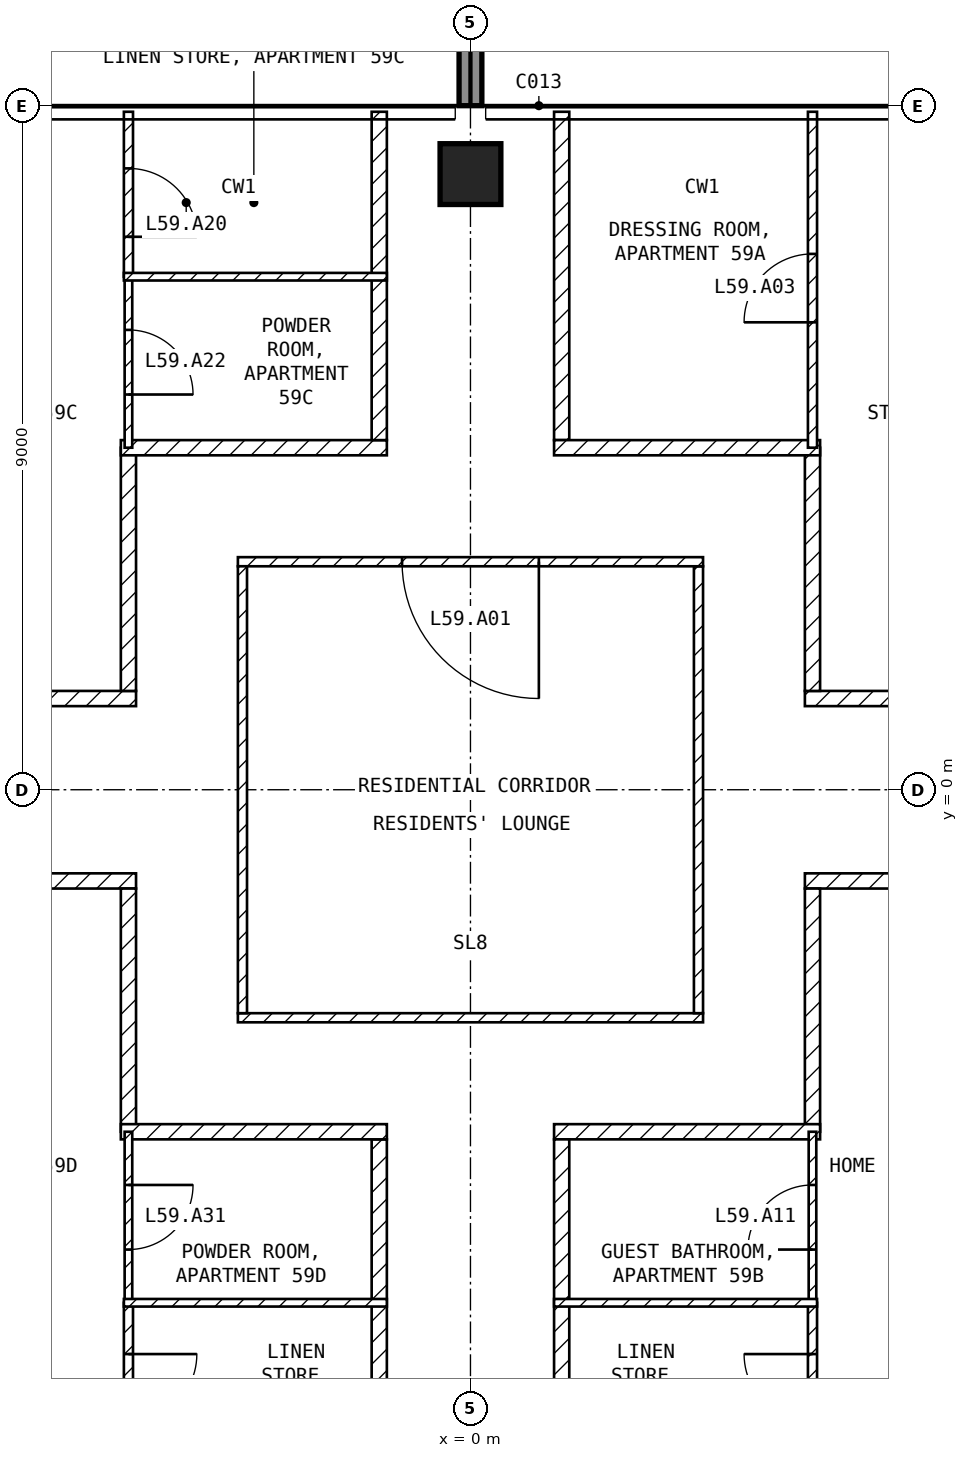
"""IFC4 building model, lengths in metres.
Left out: names, types, materials, properties, quantities, classifications, styles, units other than length and angle.
Written with IfcOpenShell. Run it as: python <this file> out.ifc"""

import sys

from ifc_helpers import new_model, si_unit, direction, frame, frame_2d, origin, origin_2d, place, context, subcontext, project, spatial, rectangle, extrude, element, fill, save


model = new_model("IFC4")
c1 = context("Model", 3, precision=1e-05, world=origin(), true_north=direction((0.0, 1.0)))
c2 = subcontext(c1, "Body", "Model", "MODEL_VIEW")
j1 = project(units=[si_unit("LENGTHUNIT", "METRE"), si_unit("PLANEANGLEUNIT", "RADIAN")], contexts=[c1])
p1 = place(None, origin())
s1 = spatial("IfcSite", under=j1, at=p1, CompositionType="ELEMENT")
p2 = place(p1, origin())
s2 = spatial("IfcBuilding", under=s1, at=p2, CompositionType="ELEMENT")
p3 = place(p2, frame((0.0, 0.0, 236.0)))
s3 = spatial("IfcBuildingStorey", under=s2, at=p3, CompositionType="ELEMENT", Elevation=236.0)
p4 = place(p3, frame((0.0, 8.1, -0.25), z_axis=(0.0, 0.0, 1.0), x_axis=(1.0, 0.0, 0.0)))
e1 = element("IfcColumn", 1, at=p4, inside=s3, PredefinedType="COLUMN", context=c2, shape_type="SweptSolid", body=[
    extrude(rectangle(XDim=0.8, YDim=0.8, at=origin_2d()), origin(), (0.0, 0.0, 1.0), 3.5),
])
p5 = place(p3, frame((0.0, 9.0, 0.0), z_axis=(0.0, 0.0, 1.0), x_axis=(0.0, 1.0, 0.0)))
e2 = element("IfcWall", 2, at=p5, inside=s3, PredefinedType="SOLIDWALL", context=c2, shape_type="SweptSolid", body=[
    extrude(rectangle(XDim=2.7, YDim=0.3, at=frame_2d((1.35, 0.0))), origin(), (0.0, 0.0, 1.0), 3.25),
])
p6 = place(p3, frame((-3.06, -3.0, 0.0), z_axis=(0.0, 0.0, 1.0), x_axis=(1.0, 0.0, 0.0)))
e3 = element("IfcWall", 3, at=p6, inside=s3, PredefinedType="PARTITIONING", context=c2, shape_type="SweptSolid", body=[
    extrude(rectangle(XDim=6.12, YDim=0.12, at=frame_2d((3.06, 0.0))), origin(), (0.0, 0.0, 1.0), 3.25),
])
p7 = place(p3, frame((3.0, -2.94, 0.0), z_axis=(0.0, 0.0, 1.0), x_axis=(0.0, 1.0, 0.0)))
e4 = element("IfcWall", 4, at=p7, inside=s3, PredefinedType="PARTITIONING", context=c2, shape_type="SweptSolid", body=[
    extrude(rectangle(XDim=5.88, YDim=0.12, at=frame_2d((2.94, 0.0))), origin(), (0.0, 0.0, 1.0), 3.25),
])
p8 = place(p3, frame((3.06, 3.0, 0.0), z_axis=(0.0, 0.0, 1.0), x_axis=(-1.0, 0.0, 0.0)))
e5 = element("IfcWall", 5, at=p8, inside=s3, PredefinedType="PARTITIONING", context=c2, shape_type="SweptSolid", body=[
    extrude(rectangle(XDim=6.12, YDim=0.12, at=frame_2d((3.06, 0.0))), origin(), (0.0, 0.0, 1.0), 3.25),
])
p9 = place(p8, frame((2.16, 0.0, 0.0)))
e6 = element("IfcOpeningElement", 6, at=p9, cuts=e5, PredefinedType="OPENING", context=c2, shape_type="SweptSolid", body=[
    extrude(rectangle(XDim=1.8, YDim=2.1, at=frame_2d((0.9, 1.05))), frame((0.0, 0.07, 0.0), z_axis=(0.0, -1.0, 0.0), x_axis=(1.0, 0.0, 0.0)), (0.0, 0.0, 1.0), 0.14),
])
p10 = place(p3, frame((-3.0, 2.94, 0.0), z_axis=(0.0, 0.0, 1.0), x_axis=(0.0, -1.0, 0.0)))
e7 = element("IfcWall", 7, at=p10, inside=s3, PredefinedType="PARTITIONING", context=c2, shape_type="SweptSolid", body=[
    extrude(rectangle(XDim=5.88, YDim=0.12, at=frame_2d((2.94, 0.0))), origin(), (0.0, 0.0, 1.0), 3.25),
])
p11 = place(p3, frame((4.4, 1.2, 0.0), z_axis=(0.0, 0.0, 1.0), x_axis=(1.0, 0.0, 0.0)))
e8 = element("IfcWall", 8, at=p11, inside=s3, PredefinedType="PARTITIONING", context=c2, shape_type="SweptSolid", body=[
    extrude(rectangle(XDim=17.2, YDim=0.2, at=frame_2d((8.6, 0.0))), origin(), (0.0, 0.0, 1.0), 3.25),
])
p12 = place(p11, frame((5.3, 0.0, 0.0)))
e9 = element("IfcOpeningElement", 9, at=p12, cuts=e8, PredefinedType="OPENING", context=c2, shape_type="SweptSolid", body=[
    extrude(rectangle(XDim=1.0, YDim=2.1, at=frame_2d((0.5, 1.05))), frame((0.0, 0.11, 0.0), z_axis=(0.0, -1.0, 0.0), x_axis=(1.0, 0.0, 0.0)), (0.0, 0.0, 1.0), 0.22),
])
p13 = place(p3, frame((4.5, 4.5, 0.0), z_axis=(0.0, 0.0, 1.0), x_axis=(0.0, -1.0, 0.0)))
e10 = element("IfcWall", 10, at=p13, inside=s3, PredefinedType="PARTITIONING", context=c2, shape_type="SweptSolid", body=[
    extrude(rectangle(XDim=3.2, YDim=0.2, at=frame_2d((1.6, 0.0))), origin(), (0.0, 0.0, 1.0), 3.25),
])
p14 = place(p3, frame((1.2, 8.92, 0.0), z_axis=(0.0, 0.0, 1.0), x_axis=(0.0, -1.0, 0.0)))
e11 = element("IfcWall", 11, at=p14, inside=s3, PredefinedType="PARTITIONING", context=c2, shape_type="SweptSolid", body=[
    extrude(rectangle(XDim=4.32, YDim=0.2, at=frame_2d((2.16, 0.0))), origin(), (0.0, 0.0, 1.0), 3.25),
])
p15 = place(p3, frame((1.1, 4.5, 0.0), z_axis=(0.0, 0.0, 1.0), x_axis=(1.0, 0.0, 0.0)))
e12 = element("IfcWall", 12, at=p15, inside=s3, PredefinedType="PARTITIONING", context=c2, shape_type="SweptSolid", body=[
    extrude(rectangle(XDim=3.5, YDim=0.2, at=frame_2d((1.75, 0.0))), origin(), (0.0, 0.0, 1.0), 3.25),
])
p16 = place(p3, frame((21.6, -1.2, 0.0), z_axis=(0.0, 0.0, 1.0), x_axis=(-1.0, 0.0, 0.0)))
e13 = element("IfcWall", 13, at=p16, inside=s3, PredefinedType="PARTITIONING", context=c2, shape_type="SweptSolid", body=[
    extrude(rectangle(XDim=17.2, YDim=0.2, at=frame_2d((8.6, 0.0))), origin(), (0.0, 0.0, 1.0), 3.25),
])
p17 = place(p16, frame((10.3, 0.0, 0.0)))
e14 = element("IfcOpeningElement", 14, at=p17, cuts=e13, PredefinedType="OPENING", context=c2, shape_type="SweptSolid", body=[
    extrude(rectangle(XDim=1.0, YDim=2.1, at=frame_2d((0.5, 1.05))), frame((0.0, 0.11, 0.0), z_axis=(0.0, -1.0, 0.0), x_axis=(1.0, 0.0, 0.0)), (0.0, 0.0, 1.0), 0.22),
])
p18 = place(p3, frame((4.5, -1.3, 0.0), z_axis=(0.0, 0.0, 1.0), x_axis=(0.0, -1.0, 0.0)))
e15 = element("IfcWall", 15, at=p18, inside=s3, PredefinedType="PARTITIONING", context=c2, shape_type="SweptSolid", body=[
    extrude(rectangle(XDim=3.2, YDim=0.2, at=frame_2d((1.6, 0.0))), origin(), (0.0, 0.0, 1.0), 3.25),
])
p19 = place(p3, frame((4.6, -4.5, 0.0), z_axis=(0.0, 0.0, 1.0), x_axis=(-1.0, 0.0, 0.0)))
e16 = element("IfcWall", 16, at=p19, inside=s3, PredefinedType="PARTITIONING", context=c2, shape_type="SweptSolid", body=[
    extrude(rectangle(XDim=3.5, YDim=0.2, at=frame_2d((1.75, 0.0))), origin(), (0.0, 0.0, 1.0), 3.25),
])
p20 = place(p3, frame((1.2, -4.6, 0.0), z_axis=(0.0, 0.0, 1.0), x_axis=(0.0, -1.0, 0.0)))
e17 = element("IfcWall", 17, at=p20, inside=s3, PredefinedType="PARTITIONING", context=c2, shape_type="SweptSolid", body=[
    extrude(rectangle(XDim=4.3, YDim=0.2, at=frame_2d((2.15, 0.0))), origin(), (0.0, 0.0, 1.0), 3.25),
])
p21 = place(p3, frame((-21.6, 1.2, 0.0), z_axis=(0.0, 0.0, 1.0), x_axis=(1.0, 0.0, 0.0)))
e18 = element("IfcWall", 18, at=p21, inside=s3, PredefinedType="PARTITIONING", context=c2, shape_type="SweptSolid", body=[
    extrude(rectangle(XDim=17.2, YDim=0.2, at=frame_2d((8.6, 0.0))), origin(), (0.0, 0.0, 1.0), 3.25),
])
p22 = place(p21, frame((6.1, 0.0, 0.0)))
e19 = element("IfcOpeningElement", 19, at=p22, cuts=e18, PredefinedType="OPENING", context=c2, shape_type="SweptSolid", body=[
    extrude(rectangle(XDim=1.0, YDim=2.1, at=frame_2d((0.5, 1.05))), frame((0.0, 0.11, 0.0), z_axis=(0.0, -1.0, 0.0), x_axis=(1.0, 0.0, 0.0)), (0.0, 0.0, 1.0), 0.22),
])
p23 = place(p3, frame((-4.5, 1.3, 0.0), z_axis=(0.0, 0.0, 1.0), x_axis=(0.0, 1.0, 0.0)))
e20 = element("IfcWall", 20, at=p23, inside=s3, PredefinedType="PARTITIONING", context=c2, shape_type="SweptSolid", body=[
    extrude(rectangle(XDim=3.2, YDim=0.2, at=frame_2d((1.6, 0.0))), origin(), (0.0, 0.0, 1.0), 3.25),
])
p24 = place(p3, frame((-4.6, 4.5, 0.0), z_axis=(0.0, 0.0, 1.0), x_axis=(1.0, 0.0, 0.0)))
e21 = element("IfcWall", 21, at=p24, inside=s3, PredefinedType="PARTITIONING", context=c2, shape_type="SweptSolid", body=[
    extrude(rectangle(XDim=3.5, YDim=0.2, at=frame_2d((1.75, 0.0))), origin(), (0.0, 0.0, 1.0), 3.25),
])
p25 = place(p3, frame((-1.2, 4.6, 0.0), z_axis=(0.0, 0.0, 1.0), x_axis=(0.0, 1.0, 0.0)))
e22 = element("IfcWall", 22, at=p25, inside=s3, PredefinedType="PARTITIONING", context=c2, shape_type="SweptSolid", body=[
    extrude(rectangle(XDim=4.32, YDim=0.2, at=frame_2d((2.16, 0.0))), origin(), (0.0, 0.0, 1.0), 3.25),
])
p26 = place(p3, frame((-4.4, -1.2, 0.0), z_axis=(0.0, 0.0, 1.0), x_axis=(-1.0, 0.0, 0.0)))
e23 = element("IfcWall", 23, at=p26, inside=s3, PredefinedType="PARTITIONING", context=c2, shape_type="SweptSolid", body=[
    extrude(rectangle(XDim=17.2, YDim=0.2, at=frame_2d((8.6, 0.0))), origin(), (0.0, 0.0, 1.0), 3.25),
])
p27 = place(p26, frame((5.9, 0.0, 0.0)))
e24 = element("IfcOpeningElement", 24, at=p27, cuts=e23, PredefinedType="OPENING", context=c2, shape_type="SweptSolid", body=[
    extrude(rectangle(XDim=1.0, YDim=2.1, at=frame_2d((0.5, 1.05))), frame((0.0, 0.11, 0.0), z_axis=(0.0, -1.0, 0.0), x_axis=(1.0, 0.0, 0.0)), (0.0, 0.0, 1.0), 0.22),
])
p28 = place(p3, frame((-4.5, -4.5, 0.0), z_axis=(0.0, 0.0, 1.0), x_axis=(0.0, 1.0, 0.0)))
e25 = element("IfcWall", 25, at=p28, inside=s3, PredefinedType="PARTITIONING", context=c2, shape_type="SweptSolid", body=[
    extrude(rectangle(XDim=3.2, YDim=0.2, at=frame_2d((1.6, 0.0))), origin(), (0.0, 0.0, 1.0), 3.25),
])
p29 = place(p3, frame((-1.2, -8.9, 0.0), z_axis=(0.0, 0.0, 1.0), x_axis=(0.0, 1.0, 0.0)))
e26 = element("IfcWall", 26, at=p29, inside=s3, PredefinedType="PARTITIONING", context=c2, shape_type="SweptSolid", body=[
    extrude(rectangle(XDim=4.3, YDim=0.2, at=frame_2d((2.15, 0.0))), origin(), (0.0, 0.0, 1.0), 3.25),
])
p30 = place(p3, frame((-1.1, -4.5, 0.0), z_axis=(0.0, 0.0, 1.0), x_axis=(-1.0, 0.0, 0.0)))
e27 = element("IfcWall", 27, at=p30, inside=s3, PredefinedType="PARTITIONING", context=c2, shape_type="SweptSolid", body=[
    extrude(rectangle(XDim=3.5, YDim=0.2, at=frame_2d((1.75, 0.0))), origin(), (0.0, 0.0, 1.0), 3.25),
])
p31 = place(p3, frame((4.5, 4.5, 0.0), z_axis=(0.0, 0.0, 1.0), x_axis=(0.0, 1.0, 0.0)))
e28 = element("IfcWall", 28, at=p31, inside=s3, PredefinedType="PARTITIONING", context=c2, shape_type="SweptSolid", body=[
    extrude(rectangle(XDim=4.42, YDim=0.12, at=frame_2d((2.21, 0.0))), origin(), (0.0, 0.0, 1.0), 3.25),
])
p32 = place(p31, frame((1.65, 0.0, 0.0)))
e29 = element("IfcOpeningElement", 29, at=p32, cuts=e28, PredefinedType="OPENING", context=c2, shape_type="SweptSolid", body=[
    extrude(rectangle(XDim=0.9, YDim=2.1, at=frame_2d((0.45, 1.05))), frame((0.0, 0.07, 0.0), z_axis=(0.0, -1.0, 0.0), x_axis=(1.0, 0.0, 0.0)), (0.0, 0.0, 1.0), 0.14),
])
p33 = place(p3, frame((4.5, -6.75, 0.0), z_axis=(0.0, 0.0, 1.0), x_axis=(0.0, 1.0, 0.0)))
e30 = element("IfcWall", 30, at=p33, inside=s3, PredefinedType="PARTITIONING", context=c2, shape_type="SweptSolid", body=[
    extrude(rectangle(XDim=2.25, YDim=0.1, at=frame_2d((1.125, 0.0))), origin(), (0.0, 0.0, 1.0), 3.25),
])
p34 = place(p33, frame((0.7, 0.0, 0.0)))
e31 = element("IfcOpeningElement", 31, at=p34, cuts=e30, PredefinedType="OPENING", context=c2, shape_type="SweptSolid", body=[
    extrude(rectangle(XDim=0.85, YDim=2.1, at=frame_2d((0.425, 1.05))), frame((0.0, 0.06, 0.0), z_axis=(0.0, -1.0, 0.0), x_axis=(1.0, 0.0, 0.0)), (0.0, 0.0, 1.0), 0.12),
])
p35 = place(p3, frame((4.5, -9.0, 0.0), z_axis=(0.0, 0.0, 1.0), x_axis=(0.0, 1.0, 0.0)))
e32 = element("IfcWall", 32, at=p35, inside=s3, PredefinedType="PARTITIONING", context=c2, shape_type="SweptSolid", body=[
    extrude(rectangle(XDim=2.25, YDim=0.12, at=frame_2d((1.125, 0.0))), origin(), (0.0, 0.0, 1.0), 3.25),
])
p36 = place(p35, frame((0.675, 0.0, 0.0)))
e33 = element("IfcOpeningElement", 33, at=p36, cuts=e32, PredefinedType="OPENING", context=c2, shape_type="SweptSolid", body=[
    extrude(rectangle(XDim=0.9, YDim=2.1, at=frame_2d((0.45, 1.05))), frame((0.0, 0.07, 0.0), z_axis=(0.0, -1.0, 0.0), x_axis=(1.0, 0.0, 0.0)), (0.0, 0.0, 1.0), 0.14),
])
p37 = place(p3, frame((4.56, -6.75, 0.0), z_axis=(0.0, 0.0, 1.0), x_axis=(-1.0, 0.0, 0.0)))
e34 = element("IfcWall", 34, at=p37, inside=s3, PredefinedType="PARTITIONING", context=c2, shape_type="SweptSolid", body=[
    extrude(rectangle(XDim=3.46, YDim=0.1, at=frame_2d((1.73, 0.0))), origin(), (0.0, 0.0, 1.0), 3.25),
])
p38 = place(p3, frame((-4.5, 6.75, 0.0), z_axis=(0.0, 0.0, 1.0), x_axis=(0.0, -1.0, 0.0)))
e35 = element("IfcWall", 35, at=p38, inside=s3, PredefinedType="PARTITIONING", context=c2, shape_type="SweptSolid", body=[
    extrude(rectangle(XDim=2.25, YDim=0.1, at=frame_2d((1.125, 0.0))), origin(), (0.0, 0.0, 1.0), 3.25),
])
p39 = place(p38, frame((0.7, 0.0, 0.0)))
e36 = element("IfcOpeningElement", 36, at=p39, cuts=e35, PredefinedType="OPENING", context=c2, shape_type="SweptSolid", body=[
    extrude(rectangle(XDim=0.85, YDim=2.1, at=frame_2d((0.425, 1.05))), frame((0.0, 0.06, 0.0), z_axis=(0.0, -1.0, 0.0), x_axis=(1.0, 0.0, 0.0)), (0.0, 0.0, 1.0), 0.12),
])
p40 = place(p3, frame((-4.5, 8.92, 0.0), z_axis=(0.0, 0.0, 1.0), x_axis=(0.0, -1.0, 0.0)))
e37 = element("IfcWall", 37, at=p40, inside=s3, PredefinedType="PARTITIONING", context=c2, shape_type="SweptSolid", body=[
    extrude(rectangle(XDim=2.17, YDim=0.12, at=frame_2d((1.085, 0.0))), origin(), (0.0, 0.0, 1.0), 3.25),
])
p41 = place(p40, frame((0.745, 0.0, 0.0)))
e38 = element("IfcOpeningElement", 38, at=p41, cuts=e37, PredefinedType="OPENING", context=c2, shape_type="SweptSolid", body=[
    extrude(rectangle(XDim=0.9, YDim=2.1, at=frame_2d((0.45, 1.05))), frame((0.0, 0.07, 0.0), z_axis=(0.0, -1.0, 0.0), x_axis=(1.0, 0.0, 0.0)), (0.0, 0.0, 1.0), 0.14),
])
p42 = place(p3, frame((-4.56, 6.75, 0.0), z_axis=(0.0, 0.0, 1.0), x_axis=(1.0, 0.0, 0.0)))
e39 = element("IfcWall", 39, at=p42, inside=s3, PredefinedType="PARTITIONING", context=c2, shape_type="SweptSolid", body=[
    extrude(rectangle(XDim=3.46, YDim=0.1, at=frame_2d((1.73, 0.0))), origin(), (0.0, 0.0, 1.0), 3.25),
])
p43 = place(p3, frame((-4.5, -4.5, 0.0), z_axis=(0.0, 0.0, 1.0), x_axis=(0.0, -1.0, 0.0)))
e40 = element("IfcWall", 40, at=p43, inside=s3, PredefinedType="PARTITIONING", context=c2, shape_type="SweptSolid", body=[
    extrude(rectangle(XDim=2.25, YDim=0.1, at=frame_2d((1.125, 0.0))), origin(), (0.0, 0.0, 1.0), 3.25),
])
p44 = place(p43, frame((0.7, 0.0, 0.0)))
e41 = element("IfcOpeningElement", 41, at=p44, cuts=e40, PredefinedType="OPENING", context=c2, shape_type="SweptSolid", body=[
    extrude(rectangle(XDim=0.85, YDim=2.1, at=frame_2d((0.425, 1.05))), frame((0.0, 0.06, 0.0), z_axis=(0.0, -1.0, 0.0), x_axis=(1.0, 0.0, 0.0)), (0.0, 0.0, 1.0), 0.12),
])
p45 = place(p3, frame((-4.5, -6.75, 0.0), z_axis=(0.0, 0.0, 1.0), x_axis=(0.0, -1.0, 0.0)))
e42 = element("IfcWall", 42, at=p45, inside=s3, PredefinedType="PARTITIONING", context=c2, shape_type="SweptSolid", body=[
    extrude(rectangle(XDim=2.25, YDim=0.12, at=frame_2d((1.125, 0.0))), origin(), (0.0, 0.0, 1.0), 3.25),
])
p46 = place(p45, frame((0.675, 0.0, 0.0)))
e43 = element("IfcOpeningElement", 43, at=p46, cuts=e42, PredefinedType="OPENING", context=c2, shape_type="SweptSolid", body=[
    extrude(rectangle(XDim=0.9, YDim=2.1, at=frame_2d((0.45, 1.05))), frame((0.0, 0.07, 0.0), z_axis=(0.0, -1.0, 0.0), x_axis=(1.0, 0.0, 0.0)), (0.0, 0.0, 1.0), 0.14),
])
p47 = place(p3, frame((-1.1, -6.75, 0.0), z_axis=(0.0, 0.0, 1.0), x_axis=(-1.0, 0.0, 0.0)))
e44 = element("IfcWall", 44, at=p47, inside=s3, PredefinedType="PARTITIONING", context=c2, shape_type="SweptSolid", body=[
    extrude(rectangle(XDim=3.46, YDim=0.1, at=frame_2d((1.73, 0.0))), origin(), (0.0, 0.0, 1.0), 3.25),
])
p48 = place(p9, origin())
e45 = element("IfcDoor", 45, at=p48, inside=s3, OperationType="SINGLE_SWING_LEFT", PredefinedType="DOOR", context=c2, shape_type="SweptSolid", body=[
    extrude(rectangle(XDim=1.8, YDim=2.1, at=frame_2d((0.9, 1.05))), frame((0.0, 0.025, 0.0), z_axis=(0.0, -1.0, 0.0), x_axis=(1.0, 0.0, 0.0)), (0.0, 0.0, 1.0), 0.05),
])
fill(e6, e45)
p49 = place(p32, origin())
e46 = element("IfcDoor", 46, at=p49, inside=s3, OperationType="SINGLE_SWING_LEFT", PredefinedType="DOOR", context=c2, shape_type="SweptSolid", body=[
    extrude(rectangle(XDim=0.9, YDim=2.1, at=frame_2d((0.45, 1.05))), frame((0.0, 0.025, 0.0), z_axis=(0.0, -1.0, 0.0), x_axis=(1.0, 0.0, 0.0)), (0.0, 0.0, 1.0), 0.05),
])
fill(e29, e46)
p50 = place(p34, origin())
e47 = element("IfcDoor", 47, at=p50, inside=s3, OperationType="SINGLE_SWING_LEFT", PredefinedType="DOOR", context=c2, shape_type="SweptSolid", body=[
    extrude(rectangle(XDim=0.85, YDim=2.1, at=frame_2d((0.425, 1.05))), frame((0.0, 0.025, 0.0), z_axis=(0.0, -1.0, 0.0), x_axis=(1.0, 0.0, 0.0)), (0.0, 0.0, 1.0), 0.05),
])
fill(e31, e47)
p51 = place(p36, origin())
e48 = element("IfcDoor", 48, at=p51, inside=s3, OperationType="SINGLE_SWING_RIGHT", PredefinedType="DOOR", context=c2, shape_type="SweptSolid", body=[
    extrude(rectangle(XDim=0.9, YDim=2.1, at=frame_2d((0.45, 1.05))), frame((0.0, 0.025, 0.0), z_axis=(0.0, -1.0, 0.0), x_axis=(1.0, 0.0, 0.0)), (0.0, 0.0, 1.0), 0.05),
])
fill(e33, e48)
p52 = place(p41, origin())
e49 = element("IfcDoor", 49, at=p52, inside=s3, OperationType="SINGLE_SWING_RIGHT", PredefinedType="DOOR", context=c2, shape_type="SweptSolid", body=[
    extrude(rectangle(XDim=0.9, YDim=2.1, at=frame_2d((0.45, 1.05))), frame((0.0, 0.025, 0.0), z_axis=(0.0, -1.0, 0.0), x_axis=(1.0, 0.0, 0.0)), (0.0, 0.0, 1.0), 0.05),
])
fill(e38, e49)
p53 = place(p39, origin())
e50 = element("IfcDoor", 50, at=p53, inside=s3, OperationType="SINGLE_SWING_RIGHT", PredefinedType="DOOR", context=c2, shape_type="SweptSolid", body=[
    extrude(rectangle(XDim=0.85, YDim=2.1, at=frame_2d((0.425, 1.05))), frame((0.0, 0.025, 0.0), z_axis=(0.0, -1.0, 0.0), x_axis=(1.0, 0.0, 0.0)), (0.0, 0.0, 1.0), 0.05),
])
fill(e36, e50)
p54 = place(p46, origin())
e51 = element("IfcDoor", 51, at=p54, inside=s3, OperationType="SINGLE_SWING_LEFT", PredefinedType="DOOR", context=c2, shape_type="SweptSolid", body=[
    extrude(rectangle(XDim=0.9, YDim=2.1, at=frame_2d((0.45, 1.05))), frame((0.0, 0.025, 0.0), z_axis=(0.0, -1.0, 0.0), x_axis=(1.0, 0.0, 0.0)), (0.0, 0.0, 1.0), 0.05),
])
fill(e43, e51)
p55 = place(p44, origin())
e52 = element("IfcDoor", 52, at=p55, inside=s3, OperationType="SINGLE_SWING_LEFT", PredefinedType="DOOR", context=c2, shape_type="SweptSolid", body=[
    extrude(rectangle(XDim=0.85, YDim=2.1, at=frame_2d((0.425, 1.05))), frame((0.0, 0.025, 0.0), z_axis=(0.0, -1.0, 0.0), x_axis=(1.0, 0.0, 0.0)), (0.0, 0.0, 1.0), 0.05),
])
fill(e41, e52)
save(model, sys.argv[1])
